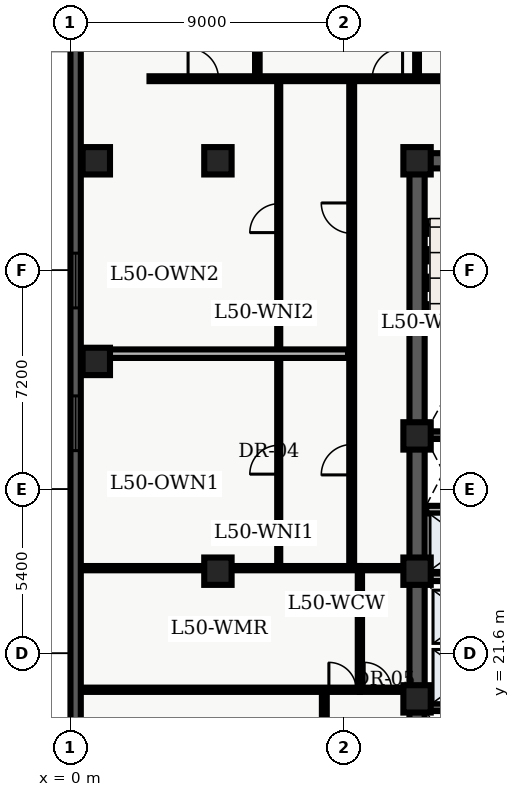
"""IFC4 building model, lengths in metres.
Left out: names, types, materials, properties, quantities, classifications, styles, units other than length and angle.
Written with IfcOpenShell. Run it as: python <this file> out.ifc"""

import sys

from ifc_helpers import new_model, entity, si_unit, converted_unit, direction, frame, origin_with_axes, origin_2d_with_axis, place, context, subcontext, project, spatial, polyline, rectangle, outline, extrude, element, fill, save


model = new_model("IFC4")
c1 = context("Model", 3, precision=1e-05, world=origin_with_axes(), true_north=direction((0.0, 1.0)))
c2 = subcontext(c1, "Body", "Model", "MODEL_VIEW")
j1 = project(units=[si_unit("LENGTHUNIT", "METRE"), converted_unit("PLANEANGLEUNIT", "DEGREE", entity("IfcPlaneAngleMeasure", 0.017), si_unit("PLANEANGLEUNIT", "RADIAN"), dimensions=[0, 0, 0, 0, 0, 0, 0])], contexts=[c1])
p1 = place(None, origin_with_axes())
s1 = spatial("IfcSite", under=j1, at=p1, CompositionType="ELEMENT")
p2 = place(p1, origin_with_axes())
s2 = spatial("IfcBuilding", under=s1, at=p2, CompositionType="ELEMENT")
p3 = place(p2, frame((0.0, 0.0, 204.3), z_axis=(0.0, 0.0, 1.0), x_axis=(1.0, 0.0, 0.0)))
s3 = spatial("IfcBuildingStorey", under=s2, at=p3, CompositionType="ELEMENT", Elevation=204.3)
p4 = place(p3, frame((11.4, 10.8, 0.0), z_axis=(0.0, 0.0, 1.0), x_axis=(0.0, 1.0, 0.0)))
e1 = element("IfcWall", 1, at=p4, inside=s3, PredefinedType="SHEAR", context=c2, shape_type="SweptSolid", body=[
    extrude(outline(polyline([(0.0, -0.25), (27.0, -0.25), (27.0, 0.25), (0.0, 0.25), (0.0, -0.25)])), origin_with_axes(), (0.0, 0.0, 1.0), 3.66),
])
p5 = place(p3, frame((11.4, 37.8, 0.0), z_axis=(0.0, 0.0, 1.0), x_axis=(1.0, 0.0, 0.0)))
e2 = element("IfcWall", 2, at=p5, inside=s3, PredefinedType="SHEAR", context=c2, shape_type="SweptSolid", body=[
    extrude(outline(polyline([(0.0, -0.25), (7.2, -0.25), (7.2, 0.25), (0.0, 0.25), (0.0, -0.25)])), origin_with_axes(), (0.0, 0.0, 1.0), 3.66),
])
p6 = place(p5, frame((2.625, 0.0, 0.0), z_axis=(0.0, 0.0, 1.0), x_axis=(1.0, 0.0, 0.0)))
e3 = element("IfcOpeningElement", 3, at=p6, cuts=e2, PredefinedType="OPENING", context=c2, shape_type="SweptSolid", body=[
    extrude(rectangle(XDim=1.05, YDim=0.52, at=origin_2d_with_axis()), origin_with_axes(), (0.0, 0.0, 1.0), 2.15),
])
for number, where, z_axis, x_axis in (
    (4, (11.65, 19.825, 0.0), (0.0, 0.0, 1.0), (1.0, 0.0, 0.0)),
    (5, (11.65, 28.775, 0.0), (0.0, 0.0, 1.0), (1.0, 0.0, 0.0)),
):
    element("IfcWall", number, at=place(p3, frame(where, z_axis=z_axis, x_axis=x_axis)), inside=s3, PredefinedType="SHEAR", context=c2, shape_type="SweptSolid", body=[
        extrude(outline(polyline([(0.0, -0.125), (6.7, -0.125), (6.7, 0.125), (0.0, 0.125), (0.0, -0.125)])), origin_with_axes(), (0.0, 0.0, 1.0), 3.66),
    ])
p7 = place(p3, frame((11.7, 24.1, 0.0), z_axis=(0.0, 0.0, 1.0), x_axis=(1.0, 0.0, 0.0)))
e6 = element("IfcWall", 6, at=p7, inside=s3, PredefinedType="SOLIDWALL", context=c2, shape_type="SweptSolid", body=[
    extrude(outline(polyline([(0.0, -0.125), (6.6, -0.125), (6.6, 0.125), (0.0, 0.125), (0.0, -0.125)])), origin_with_axes(), (0.0, 0.0, 1.0), 2.7),
])
p8 = place(p7, frame((3.6, 0.0, 0.0), z_axis=(0.0, 0.0, 1.0), x_axis=(1.0, 0.0, 0.0)))
e7 = element("IfcOpeningElement", 7, at=p8, cuts=e6, PredefinedType="OPENING", context=c2, shape_type="SweptSolid", body=[
    extrude(rectangle(XDim=0.9, YDim=0.27, at=origin_2d_with_axis()), origin_with_axes(), (0.0, 0.0, 1.0), 2.15),
])
p9 = place(p7, frame((5.65, 0.0, 0.0), z_axis=(0.0, 0.0, 1.0), x_axis=(1.0, 0.0, 0.0)))
e8 = element("IfcOpeningElement", 8, at=p9, cuts=e6, PredefinedType="OPENING", context=c2, shape_type="SweptSolid", body=[
    extrude(rectangle(XDim=0.9, YDim=0.27, at=origin_2d_with_axis()), origin_with_axes(), (0.0, 0.0, 1.0), 2.15),
])
p10 = place(p3, frame((11.7, 26.325, 0.0), z_axis=(0.0, 0.0, 1.0), x_axis=(1.0, 0.0, 0.0)))
e9 = element("IfcWall", 9, at=p10, inside=s3, PredefinedType="SOLIDWALL", context=c2, shape_type="SweptSolid", body=[
    extrude(outline(polyline([(0.0, -0.125), (6.6, -0.125), (6.6, 0.125), (0.0, 0.125), (0.0, -0.125)])), origin_with_axes(), (0.0, 0.0, 1.0), 2.7),
])
p11 = place(p10, frame((3.5, 0.0, 0.0), z_axis=(0.0, 0.0, 1.0), x_axis=(1.0, 0.0, 0.0)))
e10 = element("IfcOpeningElement", 10, at=p11, cuts=e9, PredefinedType="OPENING", context=c2, shape_type="SweptSolid", body=[
    extrude(rectangle(XDim=0.9, YDim=0.27, at=origin_2d_with_axis()), origin_with_axes(), (0.0, 0.0, 1.0), 2.15),
])
for number, where, z_axis, x_axis in (
    (11, (11.4, 20.1, 0.0), (0.0, 0.0, 1.0), (1.0, 0.0, 0.0)),
    (12, (11.4, 24.3, 0.0), (0.0, 0.0, 1.0), (1.0, 0.0, 0.0)),
    (13, (11.4, 28.75, 0.0), (0.0, 0.0, 1.0), (1.0, 0.0, 0.0)),
    (14, (11.4, 37.8, 0.0), (0.0, 0.0, 1.0), (1.0, 0.0, 0.0)),
    (15, (4.85, 24.3, 0.0), (0.0, 0.0, 1.0), (1.0, 0.0, 0.0)),
    (16, (4.85, 37.8, 0.0), (0.0, 0.0, 1.0), (1.0, 0.0, 0.0)),
    (17, (0.85, 31.2, 0.0), (0.0, 0.0, 1.0), (1.0, 0.0, 0.0)),
    (18, (0.85, 37.8, 0.0), (0.0, 0.0, 1.0), (1.0, 0.0, 0.0)),
):
    element("IfcColumn", number, at=place(p3, frame(where, z_axis=z_axis, x_axis=x_axis)), inside=s3, PredefinedType="COLUMN", context=c2, shape_type="SweptSolid", body=[
        extrude(rectangle(XDim=0.9, YDim=0.9, at=origin_2d_with_axis()), origin_with_axes(), (0.0, 0.0, 1.0), 3.9),
    ])
p12 = place(p3, frame((9.52, 20.4, 0.0), z_axis=(0.0, 0.0, 1.0), x_axis=(0.0, 1.0, 0.0)))
e19 = element("IfcWall", 19, at=p12, inside=s3, PredefinedType="PARTITIONING", context=c2, shape_type="SweptSolid", body=[
    extrude(outline(polyline([(0.0, -0.07), (4.0, -0.07), (4.0, 0.07), (0.0, 0.07), (0.0, -0.07)])), origin_with_axes(), (0.0, 0.0, 1.0), 2.7),
])
p13 = place(p3, frame((9.52, 20.4, 0.0), z_axis=(0.0, 0.0, 1.0), x_axis=(1.0, 0.0, 0.0)))
e20 = element("IfcWall", 20, at=p13, inside=s3, PredefinedType="PARTITIONING", context=c2, shape_type="SweptSolid", body=[
    extrude(outline(polyline([(0.0, -0.07), (1.58, -0.07), (1.58, 0.07), (0.0, 0.07), (0.0, -0.07)])), origin_with_axes(), (0.0, 0.0, 1.0), 2.7),
])
p14 = place(p13, frame((0.59, 0.0, 0.0), z_axis=(0.0, 0.0, 1.0), x_axis=(1.0, 0.0, 0.0)))
e21 = element("IfcOpeningElement", 21, at=p14, cuts=e20, PredefinedType="OPENING", context=c2, shape_type="SweptSolid", body=[
    extrude(rectangle(XDim=0.9, YDim=0.16, at=origin_2d_with_axis()), origin_with_axes(), (0.0, 0.0, 1.0), 2.15),
])
p15 = place(p3, frame((9.52, 24.4, 0.0), z_axis=(0.0, 0.0, 1.0), x_axis=(1.0, 0.0, 0.0)))
e22 = element("IfcWall", 22, at=p15, inside=s3, PredefinedType="PARTITIONING", context=c2, shape_type="SweptSolid", body=[
    extrude(outline(polyline([(0.0, -0.07), (1.58, -0.07), (1.58, 0.07), (0.0, 0.07), (0.0, -0.07)])), origin_with_axes(), (0.0, 0.0, 1.0), 2.7),
])
p16 = place(p3, frame((2.6, 40.5, 0.0), z_axis=(0.0, 0.0, 1.0), x_axis=(1.0, 0.0, 0.0)))
e23 = element("IfcWall", 23, at=p16, inside=s3, PredefinedType="PARTITIONING", context=c2, shape_type="SweptSolid", body=[
    extrude(outline(polyline([(0.0, -0.08), (26.946, -0.08), (26.946, 0.08), (0.0, 0.08), (0.0, -0.08)])), origin_with_axes(), (0.0, 0.0, 1.0), 2.7),
])
p17 = place(p16, frame((1.768, 0.0, 0.0), z_axis=(0.0, 0.0, 1.0), x_axis=(1.0, 0.0, 0.0)))
e24 = element("IfcOpeningElement", 24, at=p17, cuts=e23, PredefinedType="OPENING", context=c2, shape_type="SweptSolid", body=[
    extrude(rectangle(XDim=1.0, YDim=0.18, at=origin_2d_with_axis()), origin_with_axes(), (0.0, 0.0, 1.0), 2.15),
])
p18 = place(p16, frame((7.824, 0.0, 0.0), z_axis=(0.0, 0.0, 1.0), x_axis=(1.0, 0.0, 0.0)))
e25 = element("IfcOpeningElement", 25, at=p18, cuts=e23, PredefinedType="OPENING", context=c2, shape_type="SweptSolid", body=[
    extrude(rectangle(XDim=1.0, YDim=0.18, at=origin_2d_with_axis()), origin_with_axes(), (0.0, 0.0, 1.0), 2.15),
])
p19 = place(p16, frame((10.411, 0.0, 0.0), z_axis=(0.0, 0.0, 1.0), x_axis=(1.0, 0.0, 0.0)))
e26 = element("IfcOpeningElement", 26, at=p19, cuts=e23, PredefinedType="OPENING", context=c2, shape_type="SweptSolid", body=[
    extrude(rectangle(XDim=1.0, YDim=0.18, at=origin_2d_with_axis()), origin_with_axes(), (0.0, 0.0, 1.0), 2.15),
])
p20 = place(p16, frame((14.771, 0.0, 0.0), z_axis=(0.0, 0.0, 1.0), x_axis=(1.0, 0.0, 0.0)))
e27 = element("IfcOpeningElement", 27, at=p20, cuts=e23, PredefinedType="OPENING", context=c2, shape_type="SweptSolid", body=[
    extrude(rectangle(XDim=1.0, YDim=0.18, at=origin_2d_with_axis()), origin_with_axes(), (0.0, 0.0, 1.0), 2.15),
])
p21 = place(p3, frame((8.35, 7.8, 0.0), z_axis=(0.0, 0.0, 1.0), x_axis=(0.0, 1.0, 0.0)))
e28 = element("IfcWall", 28, at=p21, inside=s3, PredefinedType="PARTITIONING", context=c2, shape_type="SweptSolid", body=[
    extrude(outline(polyline([(0.0, -0.08), (12.6, -0.08), (12.6, 0.08), (0.0, 0.08), (0.0, -0.08)])), origin_with_axes(), (0.0, 0.0, 1.0), 2.7),
])
p22 = place(p21, frame((2.893, 0.0, 0.0), z_axis=(0.0, 0.0, 1.0), x_axis=(1.0, 0.0, 0.0)))
e29 = element("IfcOpeningElement", 29, at=p22, cuts=e28, PredefinedType="OPENING", context=c2, shape_type="SweptSolid", body=[
    extrude(rectangle(XDim=1.0, YDim=0.18, at=origin_2d_with_axis()), origin_with_axes(), (0.0, 0.0, 1.0), 2.15),
])
p23 = place(p21, frame((9.088, 0.0, 0.0), z_axis=(0.0, 0.0, 1.0), x_axis=(1.0, 0.0, 0.0)))
e30 = element("IfcOpeningElement", 30, at=p23, cuts=e28, PredefinedType="OPENING", context=c2, shape_type="SweptSolid", body=[
    extrude(rectangle(XDim=1.0, YDim=0.18, at=origin_2d_with_axis()), origin_with_axes(), (0.0, 0.0, 1.0), 2.15),
])
p24 = place(p3, frame((9.25, 24.4, 0.0), z_axis=(0.0, 0.0, 1.0), x_axis=(0.0, 1.0, 0.0)))
e31 = element("IfcWall", 31, at=p24, inside=s3, PredefinedType="PARTITIONING", context=c2, shape_type="SweptSolid", body=[
    extrude(outline(polyline([(0.0, -0.08), (16.1, -0.08), (16.1, 0.08), (0.0, 0.08), (0.0, -0.08)])), origin_with_axes(), (0.0, 0.0, 1.0), 2.7),
])
p25 = place(p24, frame((3.567, 0.0, 0.0), z_axis=(0.0, 0.0, 1.0), x_axis=(1.0, 0.0, 0.0)))
e32 = element("IfcOpeningElement", 32, at=p25, cuts=e31, PredefinedType="OPENING", context=c2, shape_type="SweptSolid", body=[
    extrude(rectangle(XDim=1.0, YDim=0.18, at=origin_2d_with_axis()), origin_with_axes(), (0.0, 0.0, 1.0), 2.15),
])
p26 = place(p24, frame((11.512, 0.0, 0.0), z_axis=(0.0, 0.0, 1.0), x_axis=(1.0, 0.0, 0.0)))
e33 = element("IfcOpeningElement", 33, at=p26, cuts=e31, PredefinedType="OPENING", context=c2, shape_type="SweptSolid", body=[
    extrude(rectangle(XDim=1.0, YDim=0.18, at=origin_2d_with_axis()), origin_with_axes(), (0.0, 0.0, 1.0), 2.15),
])
p27 = place(p3, frame((0.335, 20.4, 0.0), z_axis=(0.0, 0.0, 1.0), x_axis=(1.0, 0.0, 0.0)))
e34 = element("IfcWall", 34, at=p27, inside=s3, PredefinedType="PARTITIONING", context=c2, shape_type="SweptSolid", body=[
    extrude(outline(polyline([(0.0, -0.07), (9.185, -0.07), (9.185, 0.07), (0.0, 0.07), (0.0, -0.07)])), origin_with_axes(), (0.0, 0.0, 1.0), 2.7),
])
p28 = place(p27, frame((8.615, 0.0, 0.0), z_axis=(0.0, 0.0, 1.0), x_axis=(1.0, 0.0, 0.0)))
e35 = element("IfcOpeningElement", 35, at=p28, cuts=e34, PredefinedType="OPENING", context=c2, shape_type="SweptSolid", body=[
    extrude(rectangle(XDim=0.9, YDim=0.16, at=origin_2d_with_axis()), origin_with_axes(), (0.0, 0.0, 1.0), 2.15),
])
p29 = place(p3, frame((0.335, 24.4, 0.0), z_axis=(0.0, 0.0, 1.0), x_axis=(1.0, 0.0, 0.0)))
e36 = element("IfcWall", 36, at=p29, inside=s3, PredefinedType="PARTITIONING", context=c2, shape_type="SweptSolid", body=[
    extrude(outline(polyline([(0.0, -0.07), (9.185, -0.07), (9.185, 0.07), (0.0, 0.07), (0.0, -0.07)])), origin_with_axes(), (0.0, 0.0, 1.0), 2.7),
])
p30 = place(p3, frame((6.85, 24.55, 0.0), z_axis=(0.0, 0.0, 1.0), x_axis=(0.0, 1.0, 0.0)))
e37 = element("IfcWall", 37, at=p30, inside=s3, PredefinedType="PARTITIONING", context=c2, shape_type="SweptSolid", body=[
    extrude(outline(polyline([(0.0, -0.05), (15.75, -0.05), (15.75, 0.05), (0.0, 0.05), (0.0, -0.05)])), origin_with_axes(), (0.0, 0.0, 1.0), 2.7),
])
p31 = place(p30, frame((3.417, 0.0, 0.0), z_axis=(0.0, 0.0, 1.0), x_axis=(1.0, 0.0, 0.0)))
e38 = element("IfcOpeningElement", 38, at=p31, cuts=e37, PredefinedType="OPENING", context=c2, shape_type="SweptSolid", body=[
    extrude(rectangle(XDim=0.95, YDim=0.12, at=origin_2d_with_axis()), origin_with_axes(), (0.0, 0.0, 1.0), 2.15),
])
p32 = place(p30, frame((11.363, 0.0, 0.0), z_axis=(0.0, 0.0, 1.0), x_axis=(1.0, 0.0, 0.0)))
e39 = element("IfcOpeningElement", 39, at=p32, cuts=e37, PredefinedType="OPENING", context=c2, shape_type="SweptSolid", body=[
    extrude(rectangle(XDim=0.95, YDim=0.12, at=origin_2d_with_axis()), origin_with_axes(), (0.0, 0.0, 1.0), 2.15),
])
p33 = place(p3, frame((0.335, 31.455, 0.0), z_axis=(0.0, 0.0, 1.0), x_axis=(1.0, 0.0, 0.0)))
e40 = element("IfcWall", 40, at=p33, inside=s3, PredefinedType="PARTITIONING", context=c2, shape_type="SweptSolid", body=[
    extrude(outline(polyline([(0.0, -0.14), (8.795, -0.14), (8.795, 0.14), (0.0, 0.14), (0.0, -0.14)])), origin_with_axes(), (0.0, 0.0, 1.0), 2.7),
])
p34 = place(p3, frame((6.147, 40.6, 0.0), z_axis=(0.0, 0.0, 1.0), x_axis=(0.0, 1.0, 0.0)))
e41 = element("IfcWall", 41, at=p34, inside=s3, PredefinedType="PARTITIONING", context=c2, shape_type="SweptSolid", body=[
    extrude(outline(polyline([(0.0, -0.075), (7.665, -0.075), (7.665, 0.075), (0.0, 0.075), (0.0, -0.075)])), origin_with_axes(), (0.0, 0.0, 1.0), 2.7),
])
p35 = place(p3, frame((11.4, 40.6, 0.0), z_axis=(0.0, 0.0, 1.0), x_axis=(0.0, 1.0, 0.0)))
e42 = element("IfcWall", 42, at=p35, inside=s3, PredefinedType="PARTITIONING", context=c2, shape_type="SweptSolid", body=[
    extrude(outline(polyline([(0.0, -0.062), (7.665, -0.062), (7.665, 0.062), (0.0, 0.062), (0.0, -0.062)])), origin_with_axes(), (0.0, 0.0, 1.0), 2.7),
])
p36 = place(p3, frame((0.17, 2.74, 0.0), z_axis=(0.0, 0.0, 1.0), x_axis=(0.0, 1.0, 0.0)))
e43 = element("IfcWall", 43, at=p36, inside=s3, PredefinedType="SOLIDWALL", context=c2, shape_type="SweptSolid", body=[
    extrude(outline(polyline([(0.0, -0.17), (43.46, -0.17), (43.46, 0.17), (0.0, 0.17), (0.0, -0.17)])), origin_with_axes(), (0.0, 0.0, 1.0), 3.66),
])
p37 = place(p36, frame((2.948, 0.0, 0.45), z_axis=(0.0, 0.0, 1.0), x_axis=(1.0, 0.0, 0.0)))
e44 = element("IfcOpeningElement", 44, at=p37, cuts=e43, PredefinedType="OPENING", context=c2, shape_type="SweptSolid", body=[
    extrude(rectangle(XDim=1.8, YDim=0.36, at=origin_2d_with_axis()), origin_with_axes(), (0.0, 0.0, 1.0), 2.1),
])
p38 = place(p36, frame((12.339, 0.0, 0.45), z_axis=(0.0, 0.0, 1.0), x_axis=(1.0, 0.0, 0.0)))
e45 = element("IfcOpeningElement", 45, at=p38, cuts=e43, PredefinedType="OPENING", context=c2, shape_type="SweptSolid", body=[
    extrude(rectangle(XDim=1.8, YDim=0.36, at=origin_2d_with_axis()), origin_with_axes(), (0.0, 0.0, 1.0), 2.1),
])
p39 = place(p36, frame((26.426, 0.0, 0.45), z_axis=(0.0, 0.0, 1.0), x_axis=(1.0, 0.0, 0.0)))
e46 = element("IfcOpeningElement", 46, at=p39, cuts=e43, PredefinedType="OPENING", context=c2, shape_type="SweptSolid", body=[
    extrude(rectangle(XDim=1.8, YDim=0.36, at=origin_2d_with_axis()), origin_with_axes(), (0.0, 0.0, 1.0), 2.1),
])
p40 = place(p36, frame((31.121, 0.0, 0.45), z_axis=(0.0, 0.0, 1.0), x_axis=(1.0, 0.0, 0.0)))
e47 = element("IfcOpeningElement", 47, at=p40, cuts=e43, PredefinedType="OPENING", context=c2, shape_type="SweptSolid", body=[
    extrude(rectangle(XDim=1.8, YDim=0.36, at=origin_2d_with_axis()), origin_with_axes(), (0.0, 0.0, 1.0), 2.1),
])
p41 = place(p36, frame((40.062, 0.0, 0.45), z_axis=(0.0, 0.0, 1.0), x_axis=(1.0, 0.0, 0.0)))
e48 = element("IfcOpeningElement", 48, at=p41, cuts=e43, PredefinedType="OPENING", context=c2, shape_type="SweptSolid", body=[
    extrude(rectangle(XDim=1.8, YDim=0.36, at=origin_2d_with_axis()), origin_with_axes(), (0.0, 0.0, 1.0), 2.1),
])
p42 = place(p13, frame((0.59, 0.0, 0.0), z_axis=(0.0, 0.0, 1.0), x_axis=(1.0, 0.0, 0.0)))
e49 = element("IfcDoor", 49, at=p42, inside=s3, OperationType="SINGLE_SWING_LEFT", PredefinedType="DOOR", context=c2, shape_type="SweptSolid", body=[
    extrude(rectangle(XDim=0.9, YDim=0.084, at=origin_2d_with_axis()), origin_with_axes(), (0.0, 0.0, 1.0), 2.15),
])
fill(e21, e49)
p43 = place(p27, frame((8.615, 0.0, 0.0), z_axis=(0.0, 0.0, 1.0), x_axis=(1.0, 0.0, 0.0)))
e50 = element("IfcDoor", 50, at=p43, inside=s3, OperationType="SINGLE_SWING_LEFT", PredefinedType="DOOR", context=c2, shape_type="SweptSolid", body=[
    extrude(rectangle(XDim=0.9, YDim=0.084, at=origin_2d_with_axis()), origin_with_axes(), (0.0, 0.0, 1.0), 2.15),
])
fill(e35, e50)
p44 = place(p30, frame((3.417, 0.0, 0.0), z_axis=(0.0, 0.0, 1.0), x_axis=(1.0, 0.0, 0.0)))
e51 = element("IfcDoor", 51, at=p44, inside=s3, OperationType="SINGLE_SWING_LEFT", PredefinedType="DOOR", context=c2, shape_type="SweptSolid", body=[
    extrude(rectangle(XDim=0.95, YDim=0.06, at=origin_2d_with_axis()), origin_with_axes(), (0.0, 0.0, 1.0), 2.15),
])
fill(e38, e51)
p45 = place(p24, frame((3.567, 0.0, 0.0), z_axis=(0.0, 0.0, 1.0), x_axis=(1.0, 0.0, 0.0)))
e52 = element("IfcDoor", 52, at=p45, inside=s3, OperationType="SINGLE_SWING_LEFT", PredefinedType="DOOR", context=c2, shape_type="SweptSolid", body=[
    extrude(rectangle(XDim=1.0, YDim=0.09, at=origin_2d_with_axis()), origin_with_axes(), (0.0, 0.0, 1.0), 2.15),
])
fill(e32, e52)
p46 = place(p30, frame((11.363, 0.0, 0.0), z_axis=(0.0, 0.0, 1.0), x_axis=(1.0, 0.0, 0.0)))
e53 = element("IfcDoor", 53, at=p46, inside=s3, OperationType="SINGLE_SWING_LEFT", PredefinedType="DOOR", context=c2, shape_type="SweptSolid", body=[
    extrude(rectangle(XDim=0.95, YDim=0.06, at=origin_2d_with_axis()), origin_with_axes(), (0.0, 0.0, 1.0), 2.15),
])
fill(e39, e53)
p47 = place(p24, frame((11.512, 0.0, 0.0), z_axis=(0.0, 0.0, 1.0), x_axis=(1.0, 0.0, 0.0)))
e54 = element("IfcDoor", 54, at=p47, inside=s3, OperationType="SINGLE_SWING_RIGHT", PredefinedType="DOOR", context=c2, shape_type="SweptSolid", body=[
    extrude(rectangle(XDim=1.0, YDim=0.09, at=origin_2d_with_axis()), origin_with_axes(), (0.0, 0.0, 1.0), 2.15),
])
fill(e33, e54)
p48 = place(p16, frame((1.768, 0.0, 0.0), z_axis=(0.0, 0.0, 1.0), x_axis=(1.0, 0.0, 0.0)))
e55 = element("IfcDoor", 55, at=p48, inside=s3, OperationType="SINGLE_SWING_LEFT", PredefinedType="DOOR", context=c2, shape_type="SweptSolid", body=[
    extrude(rectangle(XDim=1.0, YDim=0.09, at=origin_2d_with_axis()), origin_with_axes(), (0.0, 0.0, 1.0), 2.15),
])
fill(e24, e55)
p49 = place(p16, frame((7.824, 0.0, 0.0), z_axis=(0.0, 0.0, 1.0), x_axis=(1.0, 0.0, 0.0)))
e56 = element("IfcDoor", 56, at=p49, inside=s3, OperationType="SINGLE_SWING_RIGHT", PredefinedType="DOOR", context=c2, shape_type="SweptSolid", body=[
    extrude(rectangle(XDim=1.0, YDim=0.09, at=origin_2d_with_axis()), origin_with_axes(), (0.0, 0.0, 1.0), 2.15),
])
fill(e25, e56)
p50 = place(p36, frame((26.426, 0.0, 0.45), z_axis=(0.0, 0.0, 1.0), x_axis=(1.0, 0.0, 0.0)))
e57 = element("IfcWindow", 57, at=p50, inside=s3, PredefinedType="WINDOW", context=c2, shape_type="SweptSolid", body=[
    extrude(rectangle(XDim=1.8, YDim=0.09, at=origin_2d_with_axis()), origin_with_axes(), (0.0, 0.0, 1.0), 2.1),
])
fill(e46, e57)
p51 = place(p36, frame((31.121, 0.0, 0.45), z_axis=(0.0, 0.0, 1.0), x_axis=(1.0, 0.0, 0.0)))
e58 = element("IfcWindow", 58, at=p51, inside=s3, PredefinedType="WINDOW", context=c2, shape_type="SweptSolid", body=[
    extrude(rectangle(XDim=1.8, YDim=0.09, at=origin_2d_with_axis()), origin_with_axes(), (0.0, 0.0, 1.0), 2.1),
])
fill(e47, e58)
save(model, sys.argv[1])
